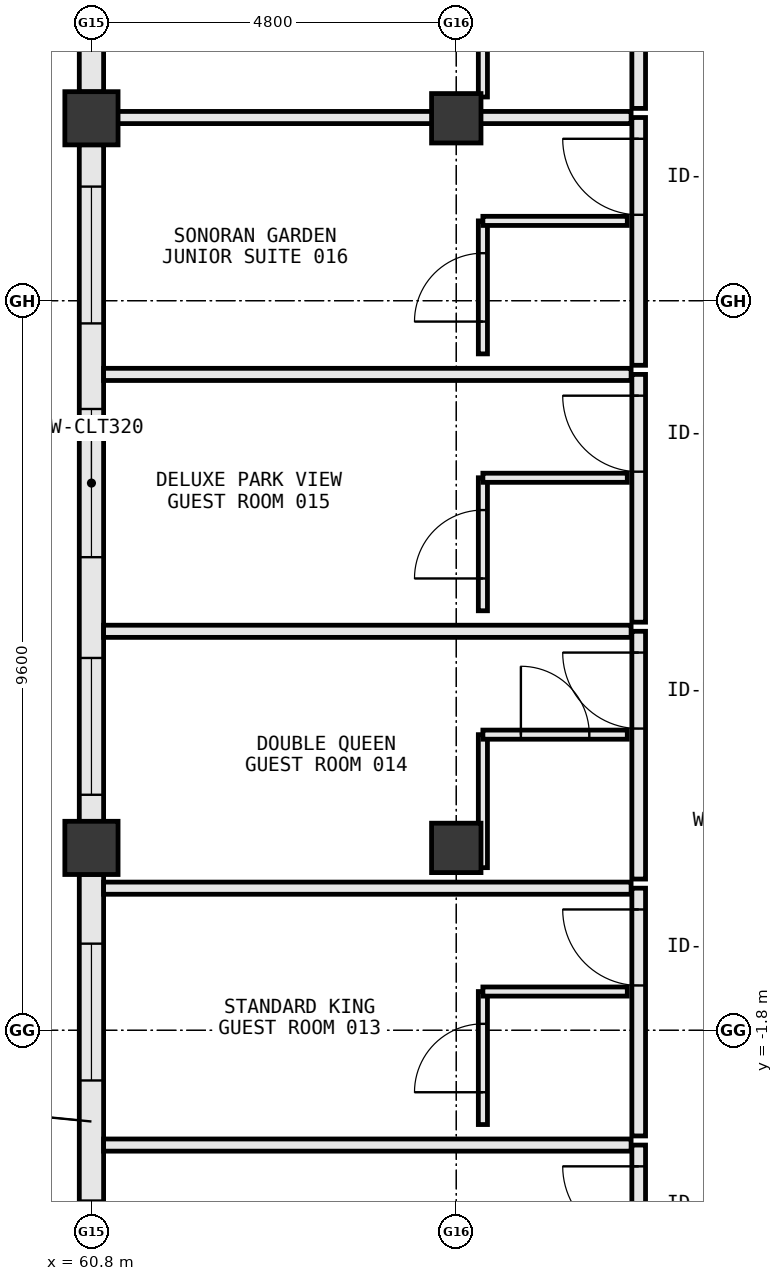
"""IFC4 building model, lengths in metres.
Left out: names, types, materials, properties, quantities, classifications, styles, units other than length and angle.
Written with IfcOpenShell. Run it as: python <this file> out.ifc"""

import sys

from ifc_helpers import new_model, si_unit, direction, frame, frame_2d, origin, origin_2d, place, context, subcontext, project, spatial, rectangle, extrude, element, fill, save


model = new_model("IFC4")
c1 = context("Model", 3, precision=1e-05, world=origin(), true_north=direction((0.0, 1.0)))
c2 = subcontext(c1, "Body", "Model", "MODEL_VIEW")
j1 = project(units=[si_unit("LENGTHUNIT", "METRE"), si_unit("PLANEANGLEUNIT", "RADIAN")], contexts=[c1])
p1 = place(None, origin())
s1 = spatial("IfcSite", under=j1, at=p1, CompositionType="ELEMENT")
p2 = place(p1, origin())
s2 = spatial("IfcBuilding", under=s1, at=p2, CompositionType="ELEMENT")
p3 = place(p2, frame((0.0, 0.0, 10.8)))
s3 = spatial("IfcBuildingStorey", under=s2, at=p3, CompositionType="ELEMENT", Elevation=10.8)
for number, where, z_axis, x_axis in (
    (1, (60.8, 0.6, 0.0), (0.0, 0.0, 1.0), (1.0, 0.0, 0.0)),
    (2, (60.8, 10.2, 0.0), (0.0, 0.0, 1.0), (1.0, 0.0, 0.0)),
):
    element("IfcColumn", number, at=place(p3, frame(where, z_axis=z_axis, x_axis=x_axis)), inside=s3, PredefinedType="COLUMN", context=c2, shape_type="SweptSolid", body=[
        extrude(rectangle(XDim=0.7, YDim=0.7, at=origin_2d()), origin(), (0.0, 0.0, 1.0), 5.4),
    ])
for number, where, z_axis, x_axis in (
    (3, (65.6, 0.6, 0.0), (0.0, 0.0, 1.0), (1.0, 0.0, 0.0)),
    (4, (65.6, 10.2, 0.0), (0.0, 0.0, 1.0), (1.0, 0.0, 0.0)),
):
    element("IfcColumn", number, at=place(p3, frame(where, z_axis=z_axis, x_axis=x_axis)), inside=s3, PredefinedType="COLUMN", context=c2, shape_type="SweptSolid", body=[
        extrude(rectangle(XDim=0.65, YDim=0.65, at=origin_2d()), origin(), (0.0, 0.0, 1.0), 5.4),
    ])
p4 = place(p3, frame((60.8, 18.252, 0.0), z_axis=(0.0, 0.0, 1.0), x_axis=(0.0, -1.0, 0.0)))
e5 = element("IfcWall", 5, at=p4, inside=s3, PredefinedType="STANDARD", context=c2, shape_type="SweptSolid", body=[
    extrude(rectangle(XDim=7.704, YDim=0.32, at=frame_2d((3.852, 0.0))), origin(), (0.0, 0.0, 1.0), 4.255),
])
p5 = place(p4, frame((5.283, 0.0, 0.85)))
e6 = element("IfcOpeningElement", 6, at=p5, cuts=e5, PredefinedType="OPENING", context=c2, shape_type="SweptSolid", body=[
    extrude(rectangle(XDim=1.8, YDim=1.85, at=frame_2d((0.9, 0.925))), frame((0.0, 0.172, 0.0), z_axis=(0.0, -1.0, 0.0), x_axis=(1.0, 0.0, 0.0)), (0.0, 0.0, 1.0), 0.344),
])
p6 = place(p4, frame((2.012, 0.0, 0.85)))
e7 = element("IfcOpeningElement", 7, at=p6, cuts=e5, PredefinedType="OPENING", context=c2, shape_type="SweptSolid", body=[
    extrude(rectangle(XDim=1.8, YDim=1.85, at=frame_2d((0.9, 0.925))), frame((0.0, 0.172, 0.0), z_axis=(0.0, -1.0, 0.0), x_axis=(1.0, 0.0, 0.0)), (0.0, 0.0, 1.0), 0.344),
])
p7 = place(p3, frame((60.8, 9.852, 0.0), z_axis=(0.0, 0.0, 1.0), x_axis=(0.0, -1.0, 0.0)))
e8 = element("IfcWall", 8, at=p7, inside=s3, PredefinedType="STANDARD", context=c2, shape_type="SweptSolid", body=[
    extrude(rectangle(XDim=8.904, YDim=0.32, at=frame_2d((4.452, 0.0))), origin(), (0.0, 0.0, 1.0), 4.155),
])
p8 = place(p7, frame((3.477, 0.0, 0.85)))
e9 = element("IfcOpeningElement", 9, at=p8, cuts=e8, PredefinedType="OPENING", context=c2, shape_type="SweptSolid", body=[
    extrude(rectangle(XDim=1.95, YDim=1.9, at=frame_2d((0.975, 0.95))), frame((0.0, 0.172, 0.0), z_axis=(0.0, -1.0, 0.0), x_axis=(1.0, 0.0, 0.0)), (0.0, 0.0, 1.0), 0.344),
])
p9 = place(p7, frame((6.753, 0.0, 0.85)))
e10 = element("IfcOpeningElement", 10, at=p9, cuts=e8, PredefinedType="OPENING", context=c2, shape_type="SweptSolid", body=[
    extrude(rectangle(XDim=1.8, YDim=1.85, at=frame_2d((0.9, 0.925))), frame((0.0, 0.172, 0.0), z_axis=(0.0, -1.0, 0.0), x_axis=(1.0, 0.0, 0.0)), (0.0, 0.0, 1.0), 0.344),
])
p10 = place(p7, frame((0.551, 0.0, 0.85)))
e11 = element("IfcOpeningElement", 11, at=p10, cuts=e8, PredefinedType="OPENING", context=c2, shape_type="SweptSolid", body=[
    extrude(rectangle(XDim=1.8, YDim=1.85, at=frame_2d((0.9, 0.925))), frame((0.0, 0.172, 0.0), z_axis=(0.0, -1.0, 0.0), x_axis=(1.0, 0.0, 0.0)), (0.0, 0.0, 1.0), 0.344),
])
p11 = place(p3, frame((60.8, 0.252, 0.0), z_axis=(0.0, 0.0, 1.0), x_axis=(0.0, -1.0, 0.0)))
e12 = element("IfcWall", 12, at=p11, inside=s3, PredefinedType="STANDARD", context=c2, shape_type="SweptSolid", body=[
    extrude(rectangle(XDim=8.904, YDim=0.32, at=frame_2d((4.452, 0.0))), origin(), (0.0, 0.0, 1.0), 4.155),
])
p12 = place(p11, frame((7.098, 0.0, 0.85)))
e13 = element("IfcOpeningElement", 13, at=p12, cuts=e12, PredefinedType="OPENING", context=c2, shape_type="SweptSolid", body=[
    extrude(rectangle(XDim=1.65, YDim=1.8, at=frame_2d((0.825, 0.9))), frame((0.0, 0.172, 0.0), z_axis=(0.0, -1.0, 0.0), x_axis=(1.0, 0.0, 0.0)), (0.0, 0.0, 1.0), 0.344),
])
p13 = place(p11, frame((4.292, 0.0, 0.85)))
e14 = element("IfcOpeningElement", 14, at=p13, cuts=e12, PredefinedType="OPENING", context=c2, shape_type="SweptSolid", body=[
    extrude(rectangle(XDim=1.8, YDim=1.85, at=frame_2d((0.9, 0.925))), frame((0.0, 0.172, 0.0), z_axis=(0.0, -1.0, 0.0), x_axis=(1.0, 0.0, 0.0)), (0.0, 0.0, 1.0), 0.344),
])
p14 = place(p11, frame((0.912, 0.0, 0.85)))
e15 = element("IfcOpeningElement", 15, at=p14, cuts=e12, PredefinedType="OPENING", context=c2, shape_type="SweptSolid", body=[
    extrude(rectangle(XDim=1.8, YDim=1.85, at=frame_2d((0.9, 0.925))), frame((0.0, 0.172, 0.0), z_axis=(0.0, -1.0, 0.0), x_axis=(1.0, 0.0, 0.0)), (0.0, 0.0, 1.0), 0.344),
])
p15 = place(p3, frame((68.0, -6.57, 0.0), z_axis=(0.0, 0.0, 1.0), x_axis=(0.0, 1.0, 0.0)))
e16 = element("IfcWall", 16, at=p15, inside=s3, PredefinedType="PARTITIONING", context=c2, shape_type="SweptSolid", body=[
    extrude(rectangle(XDim=3.26, YDim=0.18, at=frame_2d((1.63, 0.0))), origin(), (0.0, 0.0, 1.0), 4.8),
])
p16 = place(p15, frame((1.98, 0.0, 0.0)))
e17 = element("IfcOpeningElement", 17, at=p16, cuts=e16, PredefinedType="OPENING", context=c2, shape_type="SweptSolid", body=[
    extrude(rectangle(XDim=1.0, YDim=2.2, at=frame_2d((0.5, 1.1))), frame((0.0, 0.102, 0.0), z_axis=(0.0, -1.0, 0.0), x_axis=(1.0, 0.0, 0.0)), (0.0, 0.0, 1.0), 0.204),
])
p17 = place(p3, frame((60.96, -3.31, 0.0), z_axis=(0.0, 0.0, 1.0), x_axis=(1.0, 0.0, 0.0)))
e18 = element("IfcWall", 18, at=p17, inside=s3, PredefinedType="PARTITIONING", context=c2, shape_type="SweptSolid", body=[
    extrude(rectangle(XDim=6.94, YDim=0.16, at=frame_2d((3.47, 0.0))), origin(), (0.0, 0.0, 1.0), 4.8),
])
p18 = place(p3, frame((68.0, -3.19, 0.0), z_axis=(0.0, 0.0, 1.0), x_axis=(0.0, 1.0, 0.0)))
e19 = element("IfcWall", 19, at=p18, inside=s3, PredefinedType="PARTITIONING", context=c2, shape_type="SweptSolid", body=[
    extrude(rectangle(XDim=3.26, YDim=0.18, at=frame_2d((1.63, 0.0))), origin(), (0.0, 0.0, 1.0), 4.8),
])
p19 = place(p18, frame((1.98, 0.0, 0.0)))
e20 = element("IfcOpeningElement", 20, at=p19, cuts=e19, PredefinedType="OPENING", context=c2, shape_type="SweptSolid", body=[
    extrude(rectangle(XDim=1.0, YDim=2.2, at=frame_2d((0.5, 1.1))), frame((0.0, 0.102, 0.0), z_axis=(0.0, -1.0, 0.0), x_axis=(1.0, 0.0, 0.0)), (0.0, 0.0, 1.0), 0.204),
])
p20 = place(p3, frame((60.96, 0.07, 0.0), z_axis=(0.0, 0.0, 1.0), x_axis=(1.0, 0.0, 0.0)))
e21 = element("IfcWall", 21, at=p20, inside=s3, PredefinedType="PARTITIONING", context=c2, shape_type="SweptSolid", body=[
    extrude(rectangle(XDim=6.94, YDim=0.16, at=frame_2d((3.47, 0.0))), origin(), (0.0, 0.0, 1.0), 4.8),
])
p21 = place(p3, frame((65.95, -3.04, 0.0), z_axis=(0.0, 0.0, 1.0), x_axis=(0.0, 1.0, 0.0)))
e22 = element("IfcWall", 22, at=p21, inside=s3, PredefinedType="PARTITIONING", context=c2, shape_type="SweptSolid", body=[
    extrude(rectangle(XDim=1.75, YDim=0.12, at=frame_2d((0.875, 0.0))), origin(), (0.0, 0.0, 1.0), 4.155),
])
p22 = place(p21, frame((0.425, 0.0, 0.0)))
e23 = element("IfcOpeningElement", 23, at=p22, cuts=e22, PredefinedType="OPENING", context=c2, shape_type="SweptSolid", body=[
    extrude(rectangle(XDim=0.9, YDim=2.15, at=frame_2d((0.45, 1.075))), frame((0.0, 0.072, 0.0), z_axis=(0.0, -1.0, 0.0), x_axis=(1.0, 0.0, 0.0)), (0.0, 0.0, 1.0), 0.144),
])
p23 = place(p3, frame((65.95, -1.29, 0.0), z_axis=(0.0, 0.0, 1.0), x_axis=(1.0, 0.0, 0.0)))
e24 = element("IfcWall", 24, at=p23, inside=s3, PredefinedType="PARTITIONING", context=c2, shape_type="SweptSolid", body=[
    extrude(rectangle(XDim=1.9, YDim=0.12, at=frame_2d((0.95, 0.0))), origin(), (0.0, 0.0, 1.0), 4.8),
])
p24 = place(p3, frame((68.0, 0.19, 0.0), z_axis=(0.0, 0.0, 1.0), x_axis=(0.0, 1.0, 0.0)))
e25 = element("IfcWall", 25, at=p24, inside=s3, PredefinedType="PARTITIONING", context=c2, shape_type="SweptSolid", body=[
    extrude(rectangle(XDim=3.26, YDim=0.18, at=frame_2d((1.63, 0.0))), origin(), (0.0, 0.0, 1.0), 4.8),
])
p25 = place(p24, frame((1.98, 0.0, 0.0)))
e26 = element("IfcOpeningElement", 26, at=p25, cuts=e25, PredefinedType="OPENING", context=c2, shape_type="SweptSolid", body=[
    extrude(rectangle(XDim=1.0, YDim=2.2, at=frame_2d((0.5, 1.1))), frame((0.0, 0.102, 0.0), z_axis=(0.0, -1.0, 0.0), x_axis=(1.0, 0.0, 0.0)), (0.0, 0.0, 1.0), 0.204),
])
p26 = place(p3, frame((60.96, 3.45, 0.0), z_axis=(0.0, 0.0, 1.0), x_axis=(1.0, 0.0, 0.0)))
e27 = element("IfcWall", 27, at=p26, inside=s3, PredefinedType="PARTITIONING", context=c2, shape_type="SweptSolid", body=[
    extrude(rectangle(XDim=6.94, YDim=0.16, at=frame_2d((3.47, 0.0))), origin(), (0.0, 0.0, 1.0), 4.8),
])
p27 = place(p3, frame((65.95, 0.34, 0.0), z_axis=(0.0, 0.0, 1.0), x_axis=(0.0, 1.0, 0.0)))
e28 = element("IfcWall", 28, at=p27, inside=s3, PredefinedType="PARTITIONING", context=c2, shape_type="SweptSolid", body=[
    extrude(rectangle(XDim=1.75, YDim=0.12, at=frame_2d((0.875, 0.0))), origin(), (0.0, 0.0, 1.0), 4.155),
])
p28 = place(p3, frame((65.95, 2.09, 0.0), z_axis=(0.0, 0.0, 1.0), x_axis=(1.0, 0.0, 0.0)))
e29 = element("IfcWall", 29, at=p28, inside=s3, PredefinedType="PARTITIONING", context=c2, shape_type="SweptSolid", body=[
    extrude(rectangle(XDim=1.9, YDim=0.12, at=frame_2d((0.95, 0.0))), origin(), (0.0, 0.0, 1.0), 4.8),
])
p29 = place(p28, frame((0.5, 0.0, 0.0)))
e30 = element("IfcOpeningElement", 30, at=p29, cuts=e29, PredefinedType="OPENING", context=c2, shape_type="SweptSolid", body=[
    extrude(rectangle(XDim=0.9, YDim=2.15, at=frame_2d((0.45, 1.075))), frame((0.0, 0.072, 0.0), z_axis=(0.0, -1.0, 0.0), x_axis=(1.0, 0.0, 0.0)), (0.0, 0.0, 1.0), 0.144),
])
p30 = place(p3, frame((68.0, 3.57, 0.0), z_axis=(0.0, 0.0, 1.0), x_axis=(0.0, 1.0, 0.0)))
e31 = element("IfcWall", 31, at=p30, inside=s3, PredefinedType="PARTITIONING", context=c2, shape_type="SweptSolid", body=[
    extrude(rectangle(XDim=3.26, YDim=0.18, at=frame_2d((1.63, 0.0))), origin(), (0.0, 0.0, 1.0), 4.8),
])
p31 = place(p30, frame((1.98, 0.0, 0.0)))
e32 = element("IfcOpeningElement", 32, at=p31, cuts=e31, PredefinedType="OPENING", context=c2, shape_type="SweptSolid", body=[
    extrude(rectangle(XDim=1.0, YDim=2.2, at=frame_2d((0.5, 1.1))), frame((0.0, 0.102, 0.0), z_axis=(0.0, -1.0, 0.0), x_axis=(1.0, 0.0, 0.0)), (0.0, 0.0, 1.0), 0.204),
])
p32 = place(p3, frame((60.96, 6.83, 0.0), z_axis=(0.0, 0.0, 1.0), x_axis=(1.0, 0.0, 0.0)))
e33 = element("IfcWall", 33, at=p32, inside=s3, PredefinedType="PARTITIONING", context=c2, shape_type="SweptSolid", body=[
    extrude(rectangle(XDim=6.94, YDim=0.16, at=frame_2d((3.47, 0.0))), origin(), (0.0, 0.0, 1.0), 4.8),
])
p33 = place(p3, frame((65.95, 3.72, 0.0), z_axis=(0.0, 0.0, 1.0), x_axis=(0.0, 1.0, 0.0)))
e34 = element("IfcWall", 34, at=p33, inside=s3, PredefinedType="PARTITIONING", context=c2, shape_type="SweptSolid", body=[
    extrude(rectangle(XDim=1.75, YDim=0.12, at=frame_2d((0.875, 0.0))), origin(), (0.0, 0.0, 1.0), 4.155),
])
p34 = place(p33, frame((0.425, 0.0, 0.0)))
e35 = element("IfcOpeningElement", 35, at=p34, cuts=e34, PredefinedType="OPENING", context=c2, shape_type="SweptSolid", body=[
    extrude(rectangle(XDim=0.9, YDim=2.15, at=frame_2d((0.45, 1.075))), frame((0.0, 0.072, 0.0), z_axis=(0.0, -1.0, 0.0), x_axis=(1.0, 0.0, 0.0)), (0.0, 0.0, 1.0), 0.144),
])
p35 = place(p3, frame((65.95, 5.47, 0.0), z_axis=(0.0, 0.0, 1.0), x_axis=(1.0, 0.0, 0.0)))
e36 = element("IfcWall", 36, at=p35, inside=s3, PredefinedType="PARTITIONING", context=c2, shape_type="SweptSolid", body=[
    extrude(rectangle(XDim=1.9, YDim=0.12, at=frame_2d((0.95, 0.0))), origin(), (0.0, 0.0, 1.0), 4.8),
])
p36 = place(p3, frame((68.0, 6.95, 0.0), z_axis=(0.0, 0.0, 1.0), x_axis=(0.0, 1.0, 0.0)))
e37 = element("IfcWall", 37, at=p36, inside=s3, PredefinedType="PARTITIONING", context=c2, shape_type="SweptSolid", body=[
    extrude(rectangle(XDim=3.26, YDim=0.18, at=frame_2d((1.63, 0.0))), origin(), (0.0, 0.0, 1.0), 4.8),
])
p37 = place(p36, frame((1.98, 0.0, 0.0)))
e38 = element("IfcOpeningElement", 38, at=p37, cuts=e37, PredefinedType="OPENING", context=c2, shape_type="SweptSolid", body=[
    extrude(rectangle(XDim=1.0, YDim=2.2, at=frame_2d((0.5, 1.1))), frame((0.0, 0.102, 0.0), z_axis=(0.0, -1.0, 0.0), x_axis=(1.0, 0.0, 0.0)), (0.0, 0.0, 1.0), 0.204),
])
p38 = place(p3, frame((60.96, 10.21, 0.0), z_axis=(0.0, 0.0, 1.0), x_axis=(1.0, 0.0, 0.0)))
e39 = element("IfcWall", 39, at=p38, inside=s3, PredefinedType="PARTITIONING", context=c2, shape_type="SweptSolid", body=[
    extrude(rectangle(XDim=6.94, YDim=0.16, at=frame_2d((3.47, 0.0))), origin(), (0.0, 0.0, 1.0), 4.175),
])
p39 = place(p3, frame((65.95, 7.1, 0.0), z_axis=(0.0, 0.0, 1.0), x_axis=(0.0, 1.0, 0.0)))
e40 = element("IfcWall", 40, at=p39, inside=s3, PredefinedType="PARTITIONING", context=c2, shape_type="SweptSolid", body=[
    extrude(rectangle(XDim=1.75, YDim=0.12, at=frame_2d((0.875, 0.0))), origin(), (0.0, 0.0, 1.0), 4.155),
])
p40 = place(p39, frame((0.425, 0.0, 0.0)))
e41 = element("IfcOpeningElement", 41, at=p40, cuts=e40, PredefinedType="OPENING", context=c2, shape_type="SweptSolid", body=[
    extrude(rectangle(XDim=0.9, YDim=2.15, at=frame_2d((0.45, 1.075))), frame((0.0, 0.072, 0.0), z_axis=(0.0, -1.0, 0.0), x_axis=(1.0, 0.0, 0.0)), (0.0, 0.0, 1.0), 0.144),
])
p41 = place(p3, frame((65.95, 8.85, 0.0), z_axis=(0.0, 0.0, 1.0), x_axis=(1.0, 0.0, 0.0)))
e42 = element("IfcWall", 42, at=p41, inside=s3, PredefinedType="PARTITIONING", context=c2, shape_type="SweptSolid", body=[
    extrude(rectangle(XDim=1.9, YDim=0.12, at=frame_2d((0.95, 0.0))), origin(), (0.0, 0.0, 1.0), 4.8),
])
p42 = place(p3, frame((68.0, 10.33, 0.0), z_axis=(0.0, 0.0, 1.0), x_axis=(0.0, 1.0, 0.0)))
e43 = element("IfcWall", 43, at=p42, inside=s3, PredefinedType="PARTITIONING", context=c2, shape_type="SweptSolid", body=[
    extrude(rectangle(XDim=3.26, YDim=0.18, at=frame_2d((1.63, 0.0))), origin(), (0.0, 0.0, 1.0), 4.8),
])
p43 = place(p42, frame((1.98, 0.0, 0.0)))
e44 = element("IfcOpeningElement", 44, at=p43, cuts=e43, PredefinedType="OPENING", context=c2, shape_type="SweptSolid", body=[
    extrude(rectangle(XDim=1.0, YDim=2.2, at=frame_2d((0.5, 1.1))), frame((0.0, 0.102, 0.0), z_axis=(0.0, -1.0, 0.0), x_axis=(1.0, 0.0, 0.0)), (0.0, 0.0, 1.0), 0.204),
])
p44 = place(p3, frame((65.95, 10.48, 0.0), z_axis=(0.0, 0.0, 1.0), x_axis=(0.0, 1.0, 0.0)))
e45 = element("IfcWall", 45, at=p44, inside=s3, PredefinedType="PARTITIONING", context=c2, shape_type="SweptSolid", body=[
    extrude(rectangle(XDim=1.75, YDim=0.12, at=frame_2d((0.875, 0.0))), origin(), (0.0, 0.0, 1.0), 4.255),
])
p45 = place(p8, origin())
e46 = element("IfcWindow", 46, at=p45, inside=s3, PartitioningType="DOUBLE_PANEL_VERTICAL", PredefinedType="WINDOW", context=c2, shape_type="SweptSolid", body=[
    extrude(rectangle(XDim=1.95, YDim=1.9, at=frame_2d((0.975, 0.95))), frame((0.0, 0.03, 0.0), z_axis=(0.0, -1.0, 0.0), x_axis=(1.0, 0.0, 0.0)), (0.0, 0.0, 1.0), 0.06),
])
fill(e9, e46)
p46 = place(p13, origin())
e47 = element("IfcWindow", 47, at=p46, inside=s3, PartitioningType="SINGLE_PANEL", PredefinedType="WINDOW", context=c2, shape_type="SweptSolid", body=[
    extrude(rectangle(XDim=1.8, YDim=1.85, at=frame_2d((0.9, 0.925))), frame((0.0, 0.03, 0.0), z_axis=(0.0, -1.0, 0.0), x_axis=(1.0, 0.0, 0.0)), (0.0, 0.0, 1.0), 0.06),
])
fill(e14, e47)
p47 = place(p14, origin())
e48 = element("IfcWindow", 48, at=p47, inside=s3, PartitioningType="SINGLE_PANEL", PredefinedType="WINDOW", context=c2, shape_type="SweptSolid", body=[
    extrude(rectangle(XDim=1.8, YDim=1.85, at=frame_2d((0.9, 0.925))), frame((0.0, 0.03, 0.0), z_axis=(0.0, -1.0, 0.0), x_axis=(1.0, 0.0, 0.0)), (0.0, 0.0, 1.0), 0.06),
])
fill(e15, e48)
p48 = place(p9, origin())
e49 = element("IfcWindow", 49, at=p48, inside=s3, PartitioningType="SINGLE_PANEL", PredefinedType="WINDOW", context=c2, shape_type="SweptSolid", body=[
    extrude(rectangle(XDim=1.8, YDim=1.85, at=frame_2d((0.9, 0.925))), frame((0.0, 0.03, 0.0), z_axis=(0.0, -1.0, 0.0), x_axis=(1.0, 0.0, 0.0)), (0.0, 0.0, 1.0), 0.06),
])
fill(e10, e49)
p49 = place(p10, origin())
e50 = element("IfcWindow", 50, at=p49, inside=s3, PartitioningType="SINGLE_PANEL", PredefinedType="WINDOW", context=c2, shape_type="SweptSolid", body=[
    extrude(rectangle(XDim=1.8, YDim=1.85, at=frame_2d((0.9, 0.925))), frame((0.0, 0.03, 0.0), z_axis=(0.0, -1.0, 0.0), x_axis=(1.0, 0.0, 0.0)), (0.0, 0.0, 1.0), 0.06),
])
fill(e11, e50)
p50 = place(p16, origin())
e51 = element("IfcDoor", 51, at=p50, inside=s3, OperationType="SINGLE_SWING_RIGHT", PredefinedType="DOOR", context=c2, shape_type="SweptSolid", body=[
    extrude(rectangle(XDim=1.0, YDim=2.2, at=frame_2d((0.5, 1.1))), frame((0.0, 0.025, 0.0), z_axis=(0.0, -1.0, 0.0), x_axis=(1.0, 0.0, 0.0)), (0.0, 0.0, 1.0), 0.05),
])
fill(e17, e51)
p51 = place(p19, origin())
e52 = element("IfcDoor", 52, at=p51, inside=s3, OperationType="SINGLE_SWING_RIGHT", PredefinedType="DOOR", context=c2, shape_type="SweptSolid", body=[
    extrude(rectangle(XDim=1.0, YDim=2.2, at=frame_2d((0.5, 1.1))), frame((0.0, 0.025, 0.0), z_axis=(0.0, -1.0, 0.0), x_axis=(1.0, 0.0, 0.0)), (0.0, 0.0, 1.0), 0.05),
])
fill(e20, e52)
p52 = place(p22, origin())
e53 = element("IfcDoor", 53, at=p52, inside=s3, OperationType="SINGLE_SWING_LEFT", PredefinedType="DOOR", context=c2, shape_type="SweptSolid", body=[
    extrude(rectangle(XDim=0.9, YDim=2.15, at=frame_2d((0.45, 1.075))), frame((0.0, 0.025, 0.0), z_axis=(0.0, -1.0, 0.0), x_axis=(1.0, 0.0, 0.0)), (0.0, 0.0, 1.0), 0.05),
])
fill(e23, e53)
p53 = place(p25, origin())
e54 = element("IfcDoor", 54, at=p53, inside=s3, OperationType="SINGLE_SWING_RIGHT", PredefinedType="DOOR", context=c2, shape_type="SweptSolid", body=[
    extrude(rectangle(XDim=1.0, YDim=2.2, at=frame_2d((0.5, 1.1))), frame((0.0, 0.025, 0.0), z_axis=(0.0, -1.0, 0.0), x_axis=(1.0, 0.0, 0.0)), (0.0, 0.0, 1.0), 0.05),
])
fill(e26, e54)
p54 = place(p29, origin())
e55 = element("IfcDoor", 55, at=p54, inside=s3, OperationType="SINGLE_SWING_LEFT", PredefinedType="DOOR", context=c2, shape_type="SweptSolid", body=[
    extrude(rectangle(XDim=0.9, YDim=2.15, at=frame_2d((0.45, 1.075))), frame((0.0, 0.025, 0.0), z_axis=(0.0, -1.0, 0.0), x_axis=(1.0, 0.0, 0.0)), (0.0, 0.0, 1.0), 0.05),
])
fill(e30, e55)
p55 = place(p31, origin())
e56 = element("IfcDoor", 56, at=p55, inside=s3, OperationType="SINGLE_SWING_RIGHT", PredefinedType="DOOR", context=c2, shape_type="SweptSolid", body=[
    extrude(rectangle(XDim=1.0, YDim=2.2, at=frame_2d((0.5, 1.1))), frame((0.0, 0.025, 0.0), z_axis=(0.0, -1.0, 0.0), x_axis=(1.0, 0.0, 0.0)), (0.0, 0.0, 1.0), 0.05),
])
fill(e32, e56)
p56 = place(p34, origin())
e57 = element("IfcDoor", 57, at=p56, inside=s3, OperationType="SINGLE_SWING_LEFT", PredefinedType="DOOR", context=c2, shape_type="SweptSolid", body=[
    extrude(rectangle(XDim=0.9, YDim=2.15, at=frame_2d((0.45, 1.075))), frame((0.0, 0.025, 0.0), z_axis=(0.0, -1.0, 0.0), x_axis=(1.0, 0.0, 0.0)), (0.0, 0.0, 1.0), 0.05),
])
fill(e35, e57)
p57 = place(p37, origin())
e58 = element("IfcDoor", 58, at=p57, inside=s3, OperationType="SINGLE_SWING_RIGHT", PredefinedType="DOOR", context=c2, shape_type="SweptSolid", body=[
    extrude(rectangle(XDim=1.0, YDim=2.2, at=frame_2d((0.5, 1.1))), frame((0.0, 0.025, 0.0), z_axis=(0.0, -1.0, 0.0), x_axis=(1.0, 0.0, 0.0)), (0.0, 0.0, 1.0), 0.05),
])
fill(e38, e58)
p58 = place(p40, origin())
e59 = element("IfcDoor", 59, at=p58, inside=s3, OperationType="SINGLE_SWING_LEFT", PredefinedType="DOOR", context=c2, shape_type="SweptSolid", body=[
    extrude(rectangle(XDim=0.9, YDim=2.15, at=frame_2d((0.45, 1.075))), frame((0.0, 0.025, 0.0), z_axis=(0.0, -1.0, 0.0), x_axis=(1.0, 0.0, 0.0)), (0.0, 0.0, 1.0), 0.05),
])
fill(e41, e59)
save(model, sys.argv[1])
